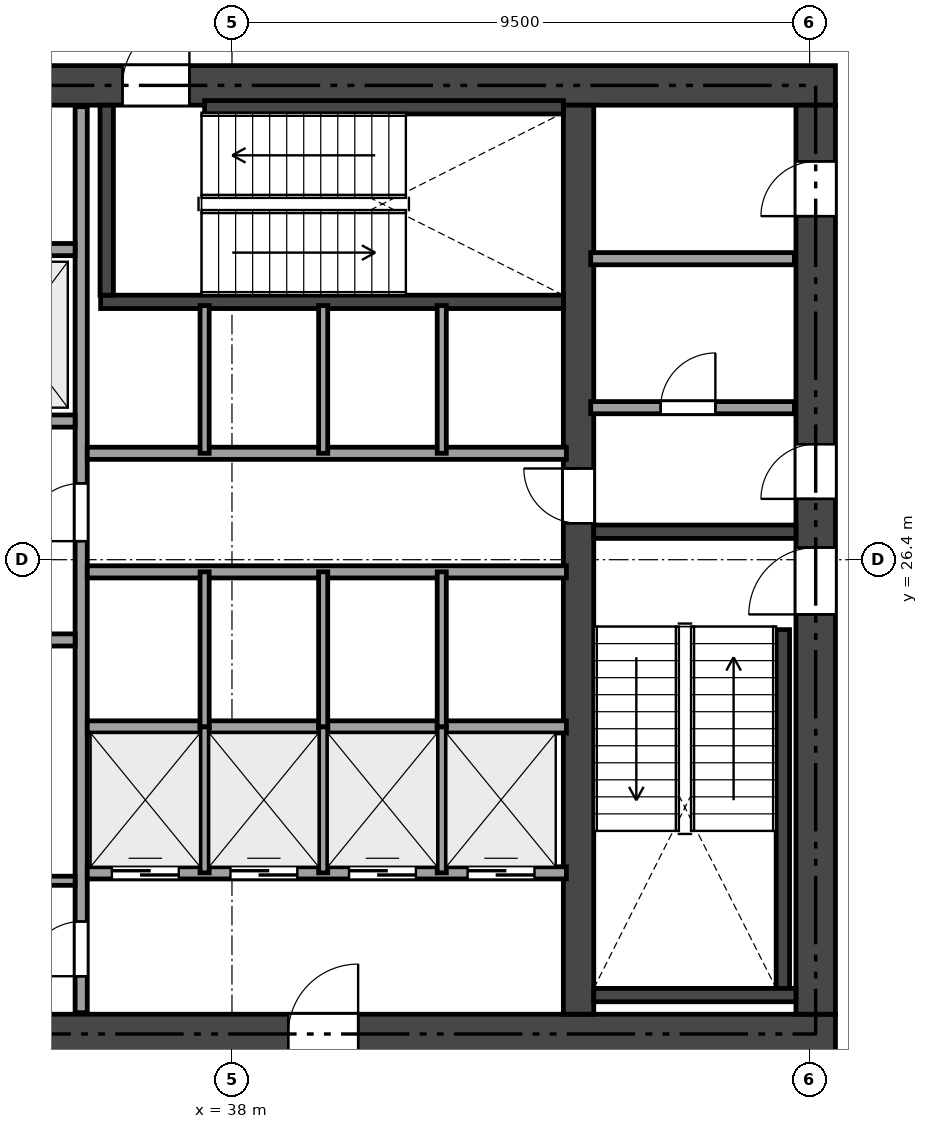
"""IFC4 building model, lengths in metres.
Left out: names, types, materials, properties, quantities, classifications, styles, units other than length and angle.
Written with IfcOpenShell. Run it as: python <this file> out.ifc"""

import sys

from ifc_helpers import new_model, si_unit, direction, frame, frame_2d, origin, place, context, subcontext, project, spatial, rectangle, extrude, element, fill, save


model = new_model("IFC4")
c1 = context("Model", 3, precision=1e-05, world=origin(), true_north=direction((0.0, 1.0)))
c2 = subcontext(c1, "Body", "Model", "MODEL_VIEW")
j1 = project(units=[si_unit("LENGTHUNIT", "METRE"), si_unit("PLANEANGLEUNIT", "RADIAN")], contexts=[c1])
p1 = place(None, origin())
s1 = spatial("IfcSite", under=j1, at=p1, CompositionType="ELEMENT")
p2 = place(p1, origin())
s2 = spatial("IfcBuilding", under=s1, at=p2, CompositionType="ELEMENT")
p3 = place(p2, frame((0.0, 0.0, 71.85)))
s3 = spatial("IfcBuildingStorey", under=s2, at=p3, CompositionType="ELEMENT", Elevation=71.85)
p4 = place(p3, frame((26.475, 18.6, 0.0), z_axis=(0.0, 0.0, 1.0), x_axis=(1.0, 0.0, 0.0)))
e1 = element("IfcWall", 1, at=p4, inside=s3, PredefinedType="SHEAR", context=c2, shape_type="SweptSolid", body=[
    extrude(rectangle(XDim=21.45, YDim=0.65, at=frame_2d((10.725, 0.0))), origin(), (0.0, 0.0, 1.0), 4.08),
])
p5 = place(p4, frame((12.45, 0.0, 0.0)))
e2 = element("IfcOpeningElement", 2, at=p5, cuts=e1, PredefinedType="OPENING", context=c2, shape_type="SweptSolid", body=[
    extrude(rectangle(XDim=1.15, YDim=2.15, at=frame_2d((0.575, 1.075))), frame((0.0, 0.335, 0.0), z_axis=(0.0, -1.0, 0.0), x_axis=(1.0, 0.0, 0.0)), (0.0, 0.0, 1.0), 0.67),
])
p6 = place(p4, frame((5.275, 0.0, 0.0)))
e3 = element("IfcOpeningElement", 3, at=p6, cuts=e1, PredefinedType="OPENING", context=c2, shape_type="SweptSolid", body=[
    extrude(rectangle(XDim=0.9, YDim=2.1, at=frame_2d((0.45, 1.05))), frame((0.0, 0.335, 0.0), z_axis=(0.0, -1.0, 0.0), x_axis=(1.0, 0.0, 0.0)), (0.0, 0.0, 1.0), 0.67),
])
p7 = place(p3, frame((26.475, 34.2, 0.0), z_axis=(0.0, 0.0, 1.0), x_axis=(1.0, 0.0, 0.0)))
e4 = element("IfcWall", 4, at=p7, inside=s3, PredefinedType="SHEAR", context=c2, shape_type="SweptSolid", body=[
    extrude(rectangle(XDim=21.45, YDim=0.65, at=frame_2d((10.725, 0.0))), origin(), (0.0, 0.0, 1.0), 4.08),
])
p8 = place(p7, frame((9.725, 0.0, 0.0)))
e5 = element("IfcOpeningElement", 5, at=p8, cuts=e4, PredefinedType="OPENING", context=c2, shape_type="SweptSolid", body=[
    extrude(rectangle(XDim=1.1, YDim=2.15, at=frame_2d((0.55, 1.075))), frame((0.0, 0.335, 0.0), z_axis=(0.0, -1.0, 0.0), x_axis=(1.0, 0.0, 0.0)), (0.0, 0.0, 1.0), 0.67),
])
p9 = place(p7, frame((1.975, 0.0, 0.0)))
e6 = element("IfcOpeningElement", 6, at=p9, cuts=e4, PredefinedType="OPENING", context=c2, shape_type="SweptSolid", body=[
    extrude(rectangle(XDim=0.9, YDim=2.1, at=frame_2d((0.45, 1.05))), frame((0.0, 0.335, 0.0), z_axis=(0.0, -1.0, 0.0), x_axis=(1.0, 0.0, 0.0)), (0.0, 0.0, 1.0), 0.67),
])
p10 = place(p7, frame((6.275, 0.0, 0.0)))
e7 = element("IfcOpeningElement", 7, at=p10, cuts=e4, PredefinedType="OPENING", context=c2, shape_type="SweptSolid", body=[
    extrude(rectangle(XDim=0.9, YDim=2.1, at=frame_2d((0.45, 1.05))), frame((0.0, 0.335, 0.0), z_axis=(0.0, -1.0, 0.0), x_axis=(1.0, 0.0, 0.0)), (0.0, 0.0, 1.0), 0.67),
])
p11 = place(p3, frame((47.6, 18.925, 0.0), z_axis=(0.0, 0.0, 1.0), x_axis=(0.0, 1.0, 0.0)))
e8 = element("IfcWall", 8, at=p11, inside=s3, PredefinedType="SHEAR", context=c2, shape_type="SweptSolid", body=[
    extrude(rectangle(XDim=14.95, YDim=0.65, at=frame_2d((7.475, 0.0))), origin(), (0.0, 0.0, 1.0), 4.08),
])
p12 = place(p11, frame((6.575, 0.0, 0.0)))
e9 = element("IfcOpeningElement", 9, at=p12, cuts=e8, PredefinedType="OPENING", context=c2, shape_type="SweptSolid", body=[
    extrude(rectangle(XDim=1.1, YDim=2.15, at=frame_2d((0.55, 1.075))), frame((0.0, 0.335, 0.0), z_axis=(0.0, -1.0, 0.0), x_axis=(1.0, 0.0, 0.0)), (0.0, 0.0, 1.0), 0.67),
])
p13 = place(p11, frame((8.475, 0.0, 0.0)))
e10 = element("IfcOpeningElement", 10, at=p13, cuts=e8, PredefinedType="OPENING", context=c2, shape_type="SweptSolid", body=[
    extrude(rectangle(XDim=0.9, YDim=2.1, at=frame_2d((0.45, 1.05))), frame((0.0, 0.335, 0.0), z_axis=(0.0, -1.0, 0.0), x_axis=(1.0, 0.0, 0.0)), (0.0, 0.0, 1.0), 0.67),
])
p14 = place(p11, frame((13.125, 0.0, 0.0)))
e11 = element("IfcOpeningElement", 11, at=p14, cuts=e8, PredefinedType="OPENING", context=c2, shape_type="SweptSolid", body=[
    extrude(rectangle(XDim=0.9, YDim=2.1, at=frame_2d((0.45, 1.05))), frame((0.0, 0.335, 0.0), z_axis=(0.0, -1.0, 0.0), x_axis=(1.0, 0.0, 0.0)), (0.0, 0.0, 1.0), 0.67),
])
p15 = place(p3, frame((43.7, 18.925, 0.0), z_axis=(0.0, 0.0, 1.0), x_axis=(0.0, 1.0, 0.0)))
e12 = element("IfcWall", 12, at=p15, inside=s3, PredefinedType="SHEAR", context=c2, shape_type="SweptSolid", body=[
    extrude(rectangle(XDim=14.95, YDim=0.5, at=frame_2d((7.475, 0.0))), origin(), (0.0, 0.0, 1.0), 4.08),
])
p16 = place(p15, frame((8.075, 0.0, 0.0)))
e13 = element("IfcOpeningElement", 13, at=p16, cuts=e12, PredefinedType="OPENING", context=c2, shape_type="SweptSolid", body=[
    extrude(rectangle(XDim=0.9, YDim=2.1, at=frame_2d((0.45, 1.05))), frame((0.0, 0.26, 0.0), z_axis=(0.0, -1.0, 0.0), x_axis=(1.0, 0.0, 0.0)), (0.0, 0.0, 1.0), 0.52),
])
p17 = place(p3, frame((43.95, 26.86, 0.0), z_axis=(0.0, 0.0, 1.0), x_axis=(1.0, 0.0, 0.0)))
e14 = element("IfcWall", 14, at=p17, inside=s3, PredefinedType="SHEAR", context=c2, shape_type="SweptSolid", body=[
    extrude(rectangle(XDim=3.325, YDim=0.22, at=frame_2d((1.663, 0.0))), origin(), (0.0, 0.0, 1.0), 4.08),
])
p18 = place(p3, frame((47.06, 19.35, 0.0), z_axis=(0.0, 0.0, 1.0), x_axis=(0.0, 1.0, 0.0)))
e15 = element("IfcWall", 15, at=p18, inside=s3, PredefinedType="SHEAR", context=c2, shape_type="SweptSolid", body=[
    extrude(rectangle(XDim=5.9, YDim=0.22, at=frame_2d((2.95, 0.0))), origin(), (0.0, 0.0, 1.0), 4.08),
])
p19 = place(p3, frame((43.95, 19.24, 0.0), z_axis=(0.0, 0.0, 1.0), x_axis=(1.0, 0.0, 0.0)))
e16 = element("IfcWall", 16, at=p19, inside=s3, PredefinedType="SHEAR", context=c2, shape_type="SweptSolid", body=[
    extrude(rectangle(XDim=3.325, YDim=0.22, at=frame_2d((1.663, 0.0))), origin(), (0.0, 0.0, 1.0), 4.08),
])
p20 = place(p3, frame((35.84, 30.64, 0.0), z_axis=(0.0, 0.0, 1.0), x_axis=(1.0, 0.0, 0.0)))
e17 = element("IfcWall", 17, at=p20, inside=s3, PredefinedType="SHEAR", context=c2, shape_type="SweptSolid", body=[
    extrude(rectangle(XDim=7.61, YDim=0.22, at=frame_2d((3.805, 0.0))), origin(), (0.0, 0.0, 1.0), 4.08),
])
p21 = place(p3, frame((35.94, 30.75, 0.0), z_axis=(0.0, 0.0, 1.0), x_axis=(0.0, 1.0, 0.0)))
e18 = element("IfcWall", 18, at=p21, inside=s3, PredefinedType="SHEAR", context=c2, shape_type="SweptSolid", body=[
    extrude(rectangle(XDim=3.125, YDim=0.22, at=frame_2d((1.562, 0.0))), origin(), (0.0, 0.0, 1.0), 4.08),
])
p22 = place(p3, frame((37.55, 33.84, 0.0), z_axis=(0.0, 0.0, 1.0), x_axis=(1.0, 0.0, 0.0)))
e19 = element("IfcWall", 19, at=p22, inside=s3, PredefinedType="SHEAR", context=c2, shape_type="SweptSolid", body=[
    extrude(rectangle(XDim=5.9, YDim=0.22, at=frame_2d((2.95, 0.0))), origin(), (0.0, 0.0, 1.0), 4.08),
])
p23 = place(p3, frame((43.9, 28.9, 0.0), z_axis=(0.0, 0.0, 1.0), x_axis=(1.0, 0.0, 0.0)))
e20 = element("IfcWall", 20, at=p23, inside=s3, PredefinedType="SOLIDWALL", context=c2, shape_type="SweptSolid", body=[
    extrude(rectangle(XDim=3.35, YDim=0.2, at=frame_2d((1.675, 0.0))), origin(), (0.0, 0.0, 1.0), 4.08),
])
p24 = place(p23, frame((1.15, 0.0, 0.0)))
e21 = element("IfcOpeningElement", 21, at=p24, cuts=e20, PredefinedType="OPENING", context=c2, shape_type="SweptSolid", body=[
    extrude(rectangle(XDim=0.9, YDim=2.1, at=frame_2d((0.45, 1.05))), frame((0.0, 0.11, 0.0), z_axis=(0.0, -1.0, 0.0), x_axis=(1.0, 0.0, 0.0)), (0.0, 0.0, 1.0), 0.22),
])
p25 = place(p3, frame((43.9, 31.35, 0.0), z_axis=(0.0, 0.0, 1.0), x_axis=(1.0, 0.0, 0.0)))
e22 = element("IfcWall", 22, at=p25, inside=s3, PredefinedType="SOLIDWALL", context=c2, shape_type="SweptSolid", body=[
    extrude(rectangle(XDim=3.35, YDim=0.2, at=frame_2d((1.675, 0.0))), origin(), (0.0, 0.0, 1.0), 4.08),
])
p26 = place(p3, frame((35.52, 18.95, 0.0), z_axis=(0.0, 0.0, 1.0), x_axis=(0.0, 1.0, 0.0)))
e23 = element("IfcWall", 23, at=p26, inside=s3, PredefinedType="SOLIDWALL", context=c2, shape_type="SweptSolid", body=[
    extrude(rectangle(XDim=14.9, YDim=0.2, at=frame_2d((7.45, 0.0))), origin(), (0.0, 0.0, 1.0), 3.601),
])
p27 = place(p26, frame((7.755, 0.0, 0.0)))
e24 = element("IfcOpeningElement", 24, at=p27, cuts=e23, PredefinedType="OPENING", context=c2, shape_type="SweptSolid", body=[
    extrude(rectangle(XDim=0.95, YDim=2.15, at=frame_2d((0.475, 1.075))), frame((0.0, 0.11, 0.0), z_axis=(0.0, -1.0, 0.0), x_axis=(1.0, 0.0, 0.0)), (0.0, 0.0, 1.0), 0.22),
])
p28 = place(p26, frame((0.6, 0.0, 0.0)))
e25 = element("IfcOpeningElement", 25, at=p28, cuts=e23, PredefinedType="OPENING", context=c2, shape_type="SweptSolid", body=[
    extrude(rectangle(XDim=0.9, YDim=2.1, at=frame_2d((0.45, 1.05))), frame((0.0, 0.11, 0.0), z_axis=(0.0, -1.0, 0.0), x_axis=(1.0, 0.0, 0.0)), (0.0, 0.0, 1.0), 0.22),
])
p29 = place(p3, frame((31.0, 28.68, 0.0), z_axis=(0.0, 0.0, 1.0), x_axis=(1.0, 0.0, 0.0)))
e26 = element("IfcWall", 26, at=p29, inside=s3, PredefinedType="SOLIDWALL", context=c2, shape_type="SweptSolid", body=[
    extrude(rectangle(XDim=4.42, YDim=0.2, at=frame_2d((2.21, 0.0))), origin(), (0.0, 0.0, 1.0), 4.08),
])
p30 = place(p29, frame((0.6, 0.0, 0.0)))
e27 = element("IfcOpeningElement", 27, at=p30, cuts=e26, PredefinedType="OPENING", context=c2, shape_type="SweptSolid", body=[
    extrude(rectangle(XDim=1.1, YDim=2.15, at=frame_2d((0.55, 1.075))), frame((0.0, 0.11, 0.0), z_axis=(0.0, -1.0, 0.0), x_axis=(1.0, 0.0, 0.0)), (0.0, 0.0, 1.0), 0.22),
])
p31 = place(p29, frame((2.85, 0.0, 0.0)))
e28 = element("IfcOpeningElement", 28, at=p31, cuts=e26, PredefinedType="OPENING", context=c2, shape_type="SweptSolid", body=[
    extrude(rectangle(XDim=1.1, YDim=2.15, at=frame_2d((0.55, 1.075))), frame((0.0, 0.11, 0.0), z_axis=(0.0, -1.0, 0.0), x_axis=(1.0, 0.0, 0.0)), (0.0, 0.0, 1.0), 0.22),
])
p32 = place(p3, frame((31.0, 31.5, 0.0), z_axis=(0.0, 0.0, 1.0), x_axis=(1.0, 0.0, 0.0)))
e29 = element("IfcWall", 29, at=p32, inside=s3, PredefinedType="SOLIDWALL", context=c2, shape_type="SweptSolid", body=[
    extrude(rectangle(XDim=4.42, YDim=0.2, at=frame_2d((2.21, 0.0))), origin(), (0.0, 0.0, 1.0), 4.08),
])
p33 = place(p3, frame((31.0, 25.08, 0.0), z_axis=(0.0, 0.0, 1.0), x_axis=(1.0, 0.0, 0.0)))
e30 = element("IfcWall", 30, at=p33, inside=s3, PredefinedType="SOLIDWALL", context=c2, shape_type="SweptSolid", body=[
    extrude(rectangle(XDim=4.42, YDim=0.2, at=frame_2d((2.21, 0.0))), origin(), (0.0, 0.0, 1.0), 4.08),
])
p34 = place(p33, frame((3.0, 0.0, 0.0)))
e31 = element("IfcOpeningElement", 31, at=p34, cuts=e30, PredefinedType="OPENING", context=c2, shape_type="SweptSolid", body=[
    extrude(rectangle(XDim=0.9, YDim=2.1, at=frame_2d((0.45, 1.05))), frame((0.0, 0.11, 0.0), z_axis=(0.0, -1.0, 0.0), x_axis=(1.0, 0.0, 0.0)), (0.0, 0.0, 1.0), 0.22),
])
p35 = place(p33, frame((0.62, 0.0, 0.0)))
e32 = element("IfcOpeningElement", 32, at=p35, cuts=e30, PredefinedType="OPENING", context=c2, shape_type="SweptSolid", body=[
    extrude(rectangle(XDim=1.2, YDim=2.15, at=frame_2d((0.6, 1.075))), frame((0.0, 0.11, 0.0), z_axis=(0.0, -1.0, 0.0), x_axis=(1.0, 0.0, 0.0)), (0.0, 0.0, 1.0), 0.22),
])
p36 = place(p3, frame((33.42, 21.12, 0.0), z_axis=(0.0, 0.0, 1.0), x_axis=(1.0, 0.0, 0.0)))
e33 = element("IfcWall", 33, at=p36, inside=s3, PredefinedType="PARTITIONING", context=c2, shape_type="SweptSolid", body=[
    extrude(rectangle(XDim=2.0, YDim=0.15, at=frame_2d((1.0, 0.0))), origin(), (0.0, 0.0, 1.0), 4.08),
])
for number, where, z_axis, x_axis in (
    (34, (35.62, 28.15, 0.0), (0.0, 0.0, 1.0), (1.0, 0.0, 0.0)),
    (35, (35.62, 26.2, 0.0), (0.0, 0.0, 1.0), (1.0, 0.0, 0.0)),
):
    element("IfcWall", number, at=place(p3, frame(where, z_axis=z_axis, x_axis=x_axis)), inside=s3, PredefinedType="SOLIDWALL", context=c2, shape_type="SweptSolid", body=[
        extrude(rectangle(XDim=7.88, YDim=0.2, at=frame_2d((3.94, 0.0))), origin(), (0.0, 0.0, 1.0), 4.08),
    ])
p37 = place(p3, frame((35.62, 23.65, 0.0), z_axis=(0.0, 0.0, 1.0), x_axis=(1.0, 0.0, 0.0)))
e36 = element("IfcWall", 36, at=p37, inside=s3, PredefinedType="SOLIDWALL", context=c2, shape_type="SweptSolid", body=[
    extrude(rectangle(XDim=7.88, YDim=0.2, at=frame_2d((3.94, 0.0))), origin(), (0.0, 0.0, 1.0), 3.601),
])
p38 = place(p3, frame((35.62, 21.25, 0.0), z_axis=(0.0, 0.0, 1.0), x_axis=(1.0, 0.0, 0.0)))
e37 = element("IfcWall", 37, at=p38, inside=s3, PredefinedType="SOLIDWALL", context=c2, shape_type="SweptSolid", body=[
    extrude(rectangle(XDim=7.88, YDim=0.2, at=frame_2d((3.94, 0.0))), origin(), (0.0, 0.0, 1.0), 4.08),
])
p39 = place(p38, frame((0.405, 0.0, 0.0)))
e38 = element("IfcOpeningElement", 38, at=p39, cuts=e37, PredefinedType="OPENING", context=c2, shape_type="SweptSolid", body=[
    extrude(rectangle(XDim=1.1, YDim=2.15, at=frame_2d((0.55, 1.075))), frame((0.0, 0.11, 0.0), z_axis=(0.0, -1.0, 0.0), x_axis=(1.0, 0.0, 0.0)), (0.0, 0.0, 1.0), 0.22),
])
p40 = place(p38, frame((2.355, 0.0, 0.0)))
e39 = element("IfcOpeningElement", 39, at=p40, cuts=e37, PredefinedType="OPENING", context=c2, shape_type="SweptSolid", body=[
    extrude(rectangle(XDim=1.1, YDim=2.15, at=frame_2d((0.55, 1.075))), frame((0.0, 0.11, 0.0), z_axis=(0.0, -1.0, 0.0), x_axis=(1.0, 0.0, 0.0)), (0.0, 0.0, 1.0), 0.22),
])
p41 = place(p38, frame((4.305, 0.0, 0.0)))
e40 = element("IfcOpeningElement", 40, at=p41, cuts=e37, PredefinedType="OPENING", context=c2, shape_type="SweptSolid", body=[
    extrude(rectangle(XDim=1.1, YDim=2.15, at=frame_2d((0.55, 1.075))), frame((0.0, 0.11, 0.0), z_axis=(0.0, -1.0, 0.0), x_axis=(1.0, 0.0, 0.0)), (0.0, 0.0, 1.0), 0.22),
])
p42 = place(p38, frame((6.255, 0.0, 0.0)))
e41 = element("IfcOpeningElement", 41, at=p42, cuts=e37, PredefinedType="OPENING", context=c2, shape_type="SweptSolid", body=[
    extrude(rectangle(XDim=1.1, YDim=2.15, at=frame_2d((0.55, 1.075))), frame((0.0, 0.11, 0.0), z_axis=(0.0, -1.0, 0.0), x_axis=(1.0, 0.0, 0.0)), (0.0, 0.0, 1.0), 0.22),
])
for number, where, z_axis, x_axis in (
    (42, (37.55, 28.15, 0.0), (0.0, 0.0, 1.0), (0.0, 1.0, 0.0)),
    (43, (39.5, 28.15, 0.0), (0.0, 0.0, 1.0), (0.0, 1.0, 0.0)),
    (44, (41.45, 28.15, 0.0), (0.0, 0.0, 1.0), (0.0, 1.0, 0.0)),
):
    element("IfcWall", number, at=place(p3, frame(where, z_axis=z_axis, x_axis=x_axis)), inside=s3, PredefinedType="PARTITIONING", context=c2, shape_type="SweptSolid", body=[
        extrude(rectangle(XDim=2.43, YDim=0.15, at=frame_2d((1.215, 0.0))), origin(), (0.0, 0.0, 1.0), 4.08),
    ])
for number, where, z_axis, x_axis in (
    (45, (37.55, 23.65, 0.0), (0.0, 0.0, 1.0), (0.0, 1.0, 0.0)),
    (46, (39.5, 23.65, 0.0), (0.0, 0.0, 1.0), (0.0, 1.0, 0.0)),
    (47, (41.45, 23.65, 0.0), (0.0, 0.0, 1.0), (0.0, 1.0, 0.0)),
):
    element("IfcWall", number, at=place(p3, frame(where, z_axis=z_axis, x_axis=x_axis)), inside=s3, PredefinedType="PARTITIONING", context=c2, shape_type="SweptSolid", body=[
        extrude(rectangle(XDim=2.55, YDim=0.15, at=frame_2d((1.275, 0.0))), origin(), (0.0, 0.0, 1.0), 3.601),
    ])
for number, where, z_axis, x_axis in (
    (48, (37.55, 21.25, 0.0), (0.0, 0.0, 1.0), (0.0, 1.0, 0.0)),
    (49, (39.5, 21.25, 0.0), (0.0, 0.0, 1.0), (0.0, 1.0, 0.0)),
    (50, (41.45, 21.25, 0.0), (0.0, 0.0, 1.0), (0.0, 1.0, 0.0)),
):
    element("IfcWall", number, at=place(p3, frame(where, z_axis=z_axis, x_axis=x_axis)), inside=s3, PredefinedType="PARTITIONING", context=c2, shape_type="SweptSolid", body=[
        extrude(rectangle(XDim=2.4, YDim=0.15, at=frame_2d((1.2, 0.0))), origin(), (0.0, 0.0, 1.0), 3.601),
    ])
p43 = place(p12, origin())
e51 = element("IfcDoor", 51, at=p43, inside=s3, OperationType="SINGLE_SWING_LEFT", PredefinedType="DOOR", context=c2, shape_type="SweptSolid", body=[
    extrude(rectangle(XDim=1.1, YDim=2.15, at=frame_2d((0.55, 1.075))), frame((0.0, 0.025, 0.0), z_axis=(0.0, -1.0, 0.0), x_axis=(1.0, 0.0, 0.0)), (0.0, 0.0, 1.0), 0.05),
])
fill(e9, e51)
p44 = place(p8, origin())
e52 = element("IfcDoor", 52, at=p44, inside=s3, OperationType="SINGLE_SWING_RIGHT", PredefinedType="DOOR", context=c2, shape_type="SweptSolid", body=[
    extrude(rectangle(XDim=1.1, YDim=2.15, at=frame_2d((0.55, 1.075))), frame((0.0, 0.025, 0.0), z_axis=(0.0, -1.0, 0.0), x_axis=(1.0, 0.0, 0.0)), (0.0, 0.0, 1.0), 0.05),
])
fill(e5, e52)
p45 = place(p27, origin())
e53 = element("IfcDoor", 53, at=p45, inside=s3, OperationType="SINGLE_SWING_LEFT", PredefinedType="DOOR", context=c2, shape_type="SweptSolid", body=[
    extrude(rectangle(XDim=0.95, YDim=2.15, at=frame_2d((0.475, 1.075))), frame((0.0, 0.025, 0.0), z_axis=(0.0, -1.0, 0.0), x_axis=(1.0, 0.0, 0.0)), (0.0, 0.0, 1.0), 0.05),
])
fill(e24, e53)
p46 = place(p16, origin())
e54 = element("IfcDoor", 54, at=p46, inside=s3, OperationType="SINGLE_SWING_RIGHT", PredefinedType="DOOR", context=c2, shape_type="SweptSolid", body=[
    extrude(rectangle(XDim=0.9, YDim=2.1, at=frame_2d((0.45, 1.05))), frame((0.0, 0.025, 0.0), z_axis=(0.0, -1.0, 0.0), x_axis=(1.0, 0.0, 0.0)), (0.0, 0.0, 1.0), 0.05),
])
fill(e13, e54)
p47 = place(p13, origin())
e55 = element("IfcDoor", 55, at=p47, inside=s3, OperationType="SINGLE_SWING_LEFT", PredefinedType="DOOR", context=c2, shape_type="SweptSolid", body=[
    extrude(rectangle(XDim=0.9, YDim=2.1, at=frame_2d((0.45, 1.05))), frame((0.0, 0.025, 0.0), z_axis=(0.0, -1.0, 0.0), x_axis=(1.0, 0.0, 0.0)), (0.0, 0.0, 1.0), 0.05),
])
fill(e10, e55)
p48 = place(p5, origin())
e56 = element("IfcDoor", 56, at=p48, inside=s3, OperationType="SINGLE_SWING_RIGHT", PredefinedType="DOOR", context=c2, shape_type="SweptSolid", body=[
    extrude(rectangle(XDim=1.15, YDim=2.15, at=frame_2d((0.575, 1.075))), frame((0.0, 0.025, 0.0), z_axis=(0.0, -1.0, 0.0), x_axis=(1.0, 0.0, 0.0)), (0.0, 0.0, 1.0), 0.05),
])
fill(e2, e56)
p49 = place(p24, origin())
e57 = element("IfcDoor", 57, at=p49, inside=s3, OperationType="SINGLE_SWING_RIGHT", PredefinedType="DOOR", context=c2, shape_type="SweptSolid", body=[
    extrude(rectangle(XDim=0.9, YDim=2.1, at=frame_2d((0.45, 1.05))), frame((0.0, 0.025, 0.0), z_axis=(0.0, -1.0, 0.0), x_axis=(1.0, 0.0, 0.0)), (0.0, 0.0, 1.0), 0.05),
])
fill(e21, e57)
p50 = place(p14, origin())
e58 = element("IfcDoor", 58, at=p50, inside=s3, OperationType="SINGLE_SWING_LEFT", PredefinedType="DOOR", context=c2, shape_type="SweptSolid", body=[
    extrude(rectangle(XDim=0.9, YDim=2.1, at=frame_2d((0.45, 1.05))), frame((0.0, 0.025, 0.0), z_axis=(0.0, -1.0, 0.0), x_axis=(1.0, 0.0, 0.0)), (0.0, 0.0, 1.0), 0.05),
])
fill(e11, e58)
p51 = place(p28, origin())
e59 = element("IfcDoor", 59, at=p51, inside=s3, OperationType="SINGLE_SWING_LEFT", PredefinedType="DOOR", context=c2, shape_type="SweptSolid", body=[
    extrude(rectangle(XDim=0.9, YDim=2.1, at=frame_2d((0.45, 1.05))), frame((0.0, 0.025, 0.0), z_axis=(0.0, -1.0, 0.0), x_axis=(1.0, 0.0, 0.0)), (0.0, 0.0, 1.0), 0.05),
])
fill(e25, e59)
p52 = place(p39, origin())
e60 = element("IfcDoor", 60, at=p52, inside=s3, OperationType="SLIDING_TO_LEFT", PredefinedType="DOOR", context=c2, shape_type="SweptSolid", body=[
    extrude(rectangle(XDim=1.1, YDim=2.15, at=frame_2d((0.55, 1.075))), frame((0.0, 0.025, 0.0), z_axis=(0.0, -1.0, 0.0), x_axis=(1.0, 0.0, 0.0)), (0.0, 0.0, 1.0), 0.05),
])
fill(e38, e60)
p53 = place(p40, origin())
e61 = element("IfcDoor", 61, at=p53, inside=s3, OperationType="SLIDING_TO_LEFT", PredefinedType="DOOR", context=c2, shape_type="SweptSolid", body=[
    extrude(rectangle(XDim=1.1, YDim=2.15, at=frame_2d((0.55, 1.075))), frame((0.0, 0.025, 0.0), z_axis=(0.0, -1.0, 0.0), x_axis=(1.0, 0.0, 0.0)), (0.0, 0.0, 1.0), 0.05),
])
fill(e39, e61)
p54 = place(p41, origin())
e62 = element("IfcDoor", 62, at=p54, inside=s3, OperationType="SLIDING_TO_LEFT", PredefinedType="DOOR", context=c2, shape_type="SweptSolid", body=[
    extrude(rectangle(XDim=1.1, YDim=2.15, at=frame_2d((0.55, 1.075))), frame((0.0, 0.025, 0.0), z_axis=(0.0, -1.0, 0.0), x_axis=(1.0, 0.0, 0.0)), (0.0, 0.0, 1.0), 0.05),
])
fill(e40, e62)
p55 = place(p42, origin())
e63 = element("IfcDoor", 63, at=p55, inside=s3, OperationType="SLIDING_TO_LEFT", PredefinedType="DOOR", context=c2, shape_type="SweptSolid", body=[
    extrude(rectangle(XDim=1.1, YDim=2.15, at=frame_2d((0.55, 1.075))), frame((0.0, 0.025, 0.0), z_axis=(0.0, -1.0, 0.0), x_axis=(1.0, 0.0, 0.0)), (0.0, 0.0, 1.0), 0.05),
])
fill(e41, e63)
save(model, sys.argv[1])
